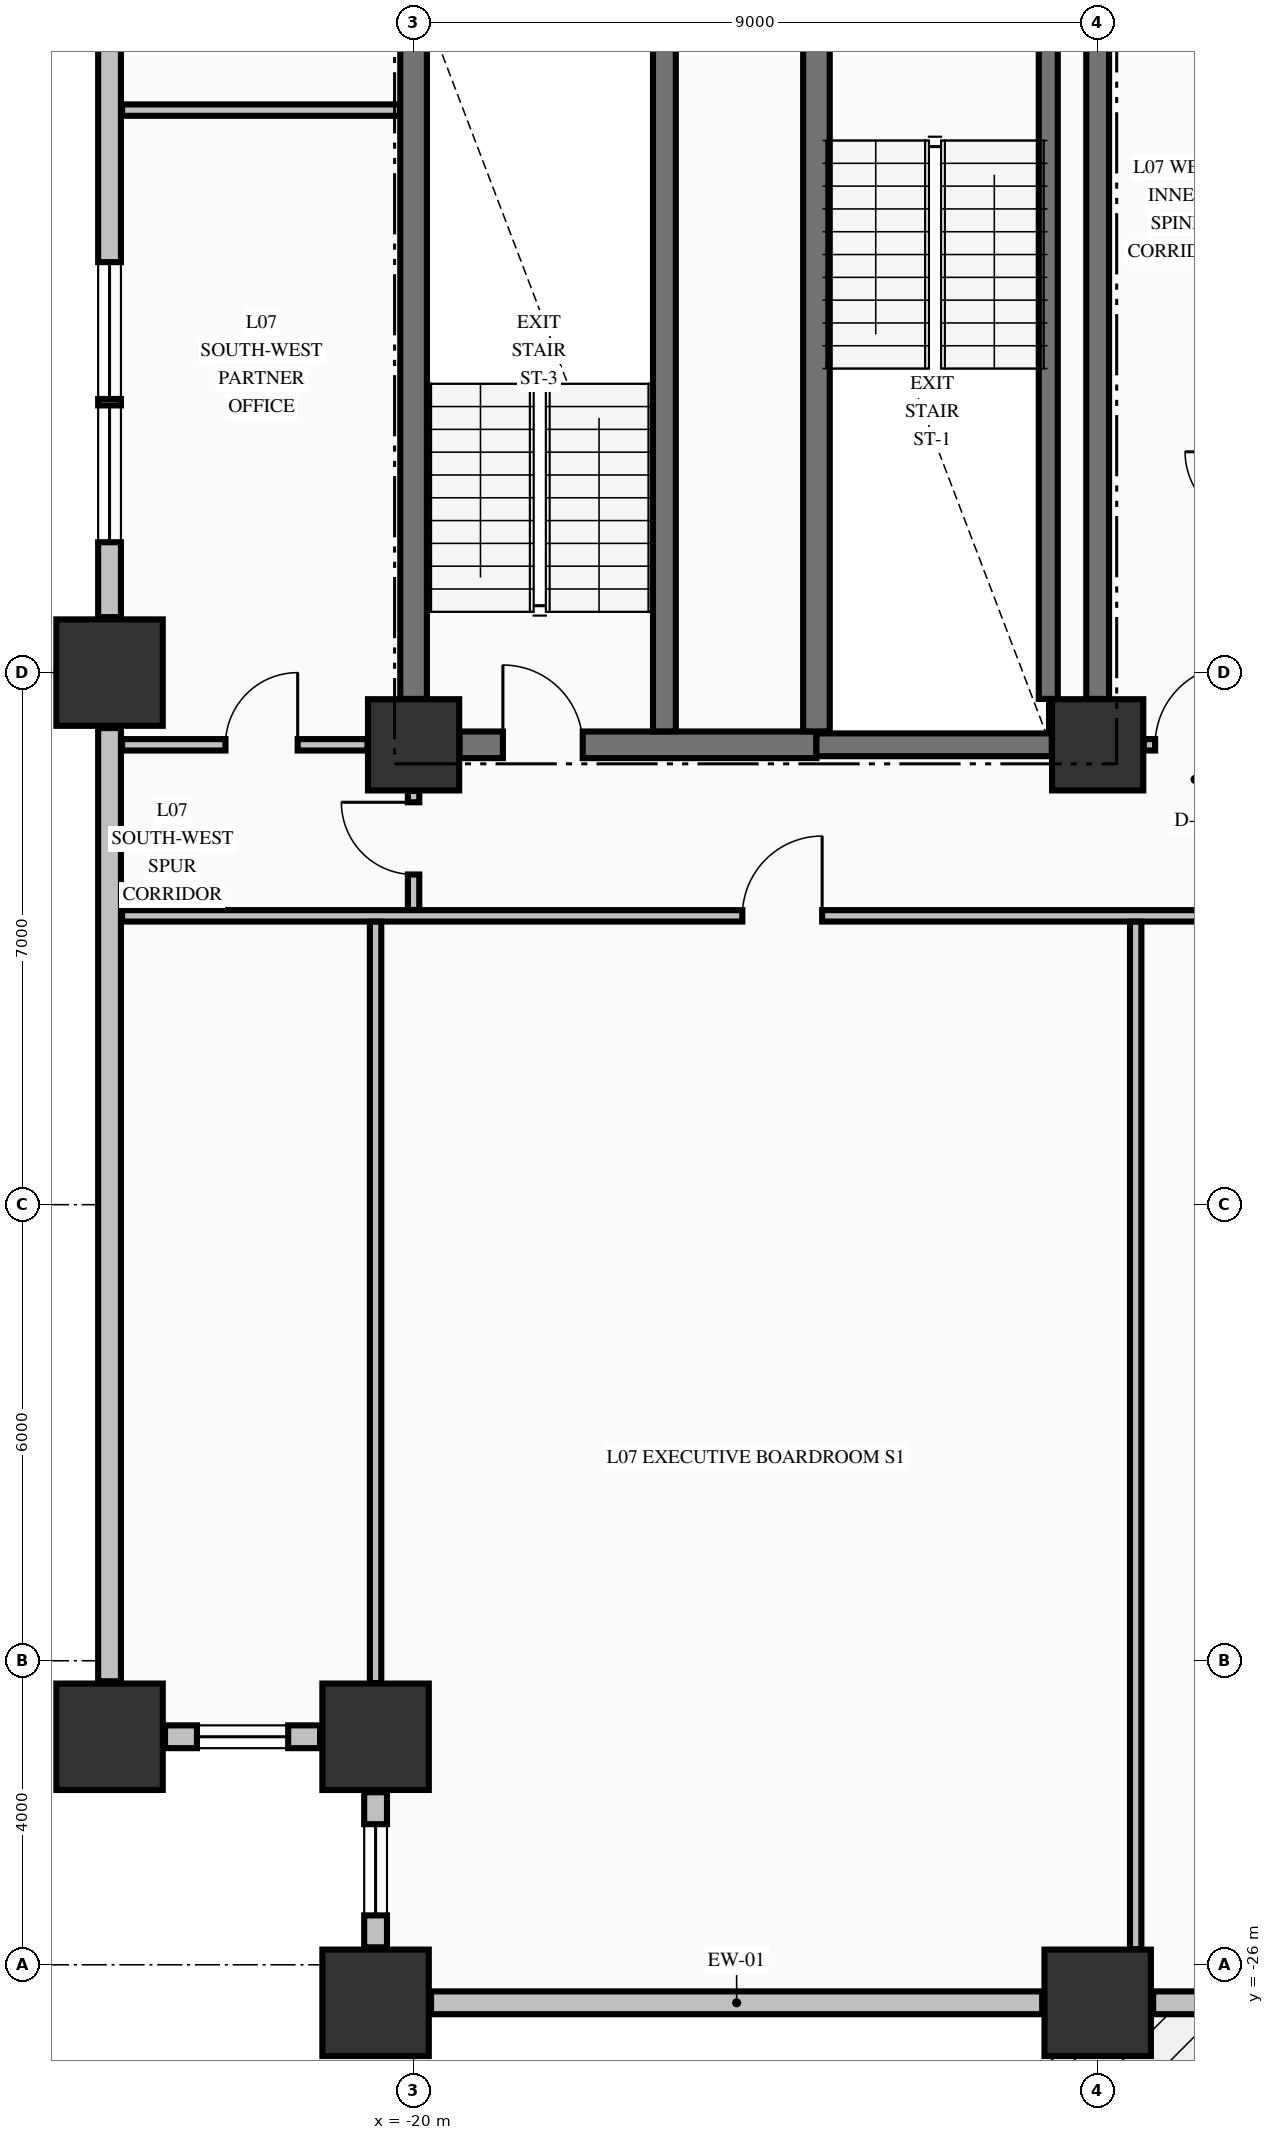
"""IFC4 building model, lengths in metres.
Left out: names, types, materials, properties, quantities, classifications, styles, units other than length and angle.
Written with IfcOpenShell. Run it as: python <this file> out.ifc"""

import sys

from ifc_helpers import new_model, si_unit, direction, frame, frame_2d, origin, origin_2d, place, context, subcontext, project, spatial, rectangle, extrude, element, fill, save


model = new_model("IFC4")
c1 = context("Model", 3, precision=1e-05, world=origin(), true_north=direction((0.0, 1.0)))
c2 = subcontext(c1, "Body", "Model", "MODEL_VIEW")
j1 = project(units=[si_unit("LENGTHUNIT", "METRE"), si_unit("PLANEANGLEUNIT", "RADIAN")], contexts=[c1])
p1 = place(None, origin())
s1 = spatial("IfcSite", under=j1, at=p1, CompositionType="ELEMENT")
p2 = place(p1, origin())
s2 = spatial("IfcBuilding", under=s1, at=p2, CompositionType="ELEMENT")
p3 = place(p2, frame((0.0, 0.0, 34.34)))
s3 = spatial("IfcBuildingStorey", under=s2, at=p3, CompositionType="ELEMENT", Elevation=34.34)
for number, where, z_axis, x_axis in (
    (1, (-20.5, -26.5, -0.3), (0.0, 0.0, 1.0), (1.0, 0.0, 0.0)),
    (2, (-11.0, -26.5, -0.3), (0.0, 0.0, 1.0), (1.0, 0.0, 0.0)),
    (3, (-24.0, -23.0, -0.3), (0.0, 0.0, 1.0), (1.0, 0.0, 0.0)),
    (4, (-24.0, -9.0, -0.3), (0.0, 0.0, 1.0), (1.0, 0.0, 0.0)),
    (5, (-20.5, -23.0, -0.3), (0.0, 0.0, 1.0), (1.0, 0.0, 0.0)),
):
    element("IfcColumn", number, at=place(p3, frame(where, z_axis=z_axis, x_axis=x_axis)), inside=s3, PredefinedType="COLUMN", context=c2, shape_type="SweptSolid", body=[
        extrude(rectangle(XDim=1.4, YDim=1.4, at=origin_2d()), origin(), (0.0, 0.0, 1.0), 3.62),
    ])
for number, where, z_axis, x_axis in (
    (6, (-20.0, -9.95, -0.3), (0.0, 0.0, 1.0), (1.0, 0.0, 0.0)),
    (7, (-11.0, -9.95, -0.3), (0.0, 0.0, 1.0), (1.0, 0.0, 0.0)),
):
    element("IfcColumn", number, at=place(p3, frame(where, z_axis=z_axis, x_axis=x_axis)), inside=s3, PredefinedType="COLUMN", context=c2, shape_type="SweptSolid", body=[
        extrude(rectangle(XDim=1.2, YDim=1.2, at=origin_2d()), origin(), (0.0, 0.0, 1.0), 3.62),
    ])
p4 = place(p3, frame((-23.27, -23.0, 0.0), z_axis=(0.0, 0.0, 1.0), x_axis=(1.0, 0.0, 0.0)))
e8 = element("IfcWall", 8, at=p4, inside=s3, PredefinedType="STANDARD", context=c2, shape_type="SweptSolid", body=[
    extrude(rectangle(XDim=2.04, YDim=0.3, at=frame_2d((1.02, 0.0))), origin(), (0.0, 0.0, 1.0), 2.712),
])
p5 = place(p4, frame((0.42, 0.0, 0.82)))
e9 = element("IfcOpeningElement", 9, at=p5, cuts=e8, PredefinedType="OPENING", context=c2, shape_type="SweptSolid", body=[
    extrude(rectangle(XDim=1.2, YDim=1.65, at=frame_2d((0.6, 0.825))), frame((0.0, 0.16, 0.0), z_axis=(0.0, -1.0, 0.0), x_axis=(1.0, 0.0, 0.0)), (0.0, 0.0, 1.0), 0.32),
])
p6 = place(p3, frame((-20.5, -23.73, 0.0), z_axis=(0.0, 0.0, 1.0), x_axis=(0.0, -1.0, 0.0)))
e10 = element("IfcWall", 10, at=p6, inside=s3, PredefinedType="STANDARD", context=c2, shape_type="SweptSolid", body=[
    extrude(rectangle(XDim=2.04, YDim=0.3, at=frame_2d((1.02, 0.0))), origin(), (0.0, 0.0, 1.0), 2.712),
])
p7 = place(p6, frame((0.42, 0.0, 0.82)))
e11 = element("IfcOpeningElement", 11, at=p7, cuts=e10, PredefinedType="OPENING", context=c2, shape_type="SweptSolid", body=[
    extrude(rectangle(XDim=1.2, YDim=1.65, at=frame_2d((0.6, 0.825))), frame((0.0, 0.16, 0.0), z_axis=(0.0, -1.0, 0.0), x_axis=(1.0, 0.0, 0.0)), (0.0, 0.0, 1.0), 0.32),
])
p8 = place(p3, frame((-19.77, -26.5, 0.0), z_axis=(0.0, 0.0, 1.0), x_axis=(1.0, 0.0, 0.0)))
e12 = element("IfcWall", 12, at=p8, inside=s3, PredefinedType="STANDARD", context=c2, shape_type="SweptSolid", body=[
    extrude(rectangle(XDim=8.04, YDim=0.3, at=frame_2d((4.02, 0.0))), origin(), (0.0, 0.0, 1.0), 2.712),
])
p9 = place(p3, frame((-10.27, -26.5, 0.0), z_axis=(0.0, 0.0, 1.0), x_axis=(1.0, 0.0, 0.0)))
e13 = element("IfcWall", 13, at=p9, inside=s3, PredefinedType="STANDARD", context=c2, shape_type="SweptSolid", body=[
    extrude(rectangle(XDim=9.54, YDim=0.3, at=frame_2d((4.77, 0.0))), origin(), (0.0, 0.0, 1.0), 2.712),
])
p10 = place(p9, frame((4.555, 0.0, 0.0)))
e14 = element("IfcOpeningElement", 14, at=p10, cuts=e13, PredefinedType="OPENING", context=c2, shape_type="SweptSolid", body=[
    extrude(rectangle(XDim=1.1, YDim=2.15, at=frame_2d((0.55, 1.075))), frame((0.0, 0.16, 0.0), z_axis=(0.0, -1.0, 0.0), x_axis=(1.0, 0.0, 0.0)), (0.0, 0.0, 1.0), 0.32),
])
p11 = place(p9, frame((1.485, 0.0, 0.78)))
e15 = element("IfcOpeningElement", 15, at=p11, cuts=e13, PredefinedType="OPENING", context=c2, shape_type="SweptSolid", body=[
    extrude(rectangle(XDim=1.8, YDim=1.72, at=frame_2d((0.9, 0.86))), frame((0.0, 0.16, 0.0), z_axis=(0.0, -1.0, 0.0), x_axis=(1.0, 0.0, 0.0)), (0.0, 0.0, 1.0), 0.32),
])
p12 = place(p9, frame((6.255, 0.0, 0.78)))
e16 = element("IfcOpeningElement", 16, at=p12, cuts=e13, PredefinedType="OPENING", context=c2, shape_type="SweptSolid", body=[
    extrude(rectangle(XDim=1.8, YDim=1.72, at=frame_2d((0.9, 0.86))), frame((0.0, 0.16, 0.0), z_axis=(0.0, -1.0, 0.0), x_axis=(1.0, 0.0, 0.0)), (0.0, 0.0, 1.0), 0.32),
])
p13 = place(p3, frame((-24.0, -9.73, 0.0), z_axis=(0.0, 0.0, 1.0), x_axis=(0.0, -1.0, 0.0)))
e17 = element("IfcWall", 17, at=p13, inside=s3, PredefinedType="STANDARD", context=c2, shape_type="SweptSolid", body=[
    extrude(rectangle(XDim=12.54, YDim=0.3, at=frame_2d((6.27, 0.0))), origin(), (0.0, 0.0, 1.0), 2.712),
])
p14 = place(p3, frame((-24.0, -0.73, 0.0), z_axis=(0.0, 0.0, 1.0), x_axis=(0.0, -1.0, 0.0)))
e18 = element("IfcWall", 18, at=p14, inside=s3, PredefinedType="STANDARD", context=c2, shape_type="SweptSolid", body=[
    extrude(rectangle(XDim=7.54, YDim=0.3, at=frame_2d((3.77, 0.0))), origin(), (0.0, 0.0, 1.0), 2.712),
])
p15 = place(p14, frame((2.87, 0.0, 0.78)))
e19 = element("IfcOpeningElement", 19, at=p15, cuts=e18, PredefinedType="OPENING", context=c2, shape_type="SweptSolid", body=[
    extrude(rectangle(XDim=1.8, YDim=1.72, at=frame_2d((0.9, 0.86))), frame((0.0, 0.16, 0.0), z_axis=(0.0, -1.0, 0.0), x_axis=(1.0, 0.0, 0.0)), (0.0, 0.0, 1.0), 0.32),
])
p16 = place(p14, frame((4.755, 0.0, 0.78)))
e20 = element("IfcOpeningElement", 20, at=p16, cuts=e18, PredefinedType="OPENING", context=c2, shape_type="SweptSolid", body=[
    extrude(rectangle(XDim=1.8, YDim=1.72, at=frame_2d((0.9, 0.86))), frame((0.0, 0.16, 0.0), z_axis=(0.0, -1.0, 0.0), x_axis=(1.0, 0.0, 0.0)), (0.0, 0.0, 1.0), 0.32),
])
p17 = place(p3, frame((-19.396, -9.95, 0.0), z_axis=(0.0, 0.0, 1.0), x_axis=(1.0, 0.0, 0.0)))
e21 = element("IfcWall", 21, at=p17, inside=s3, PredefinedType="SHEAR", context=c2, shape_type="SweptSolid", body=[
    extrude(rectangle(XDim=4.696, YDim=0.35, at=frame_2d((2.348, 0.0))), origin(), (0.0, 0.0, 1.0), 3.32),
])
p18 = place(p17, frame((0.571, 0.0, 0.0)))
e22 = element("IfcOpeningElement", 22, at=p18, cuts=e21, PredefinedType="OPENING", context=c2, shape_type="SweptSolid", body=[
    extrude(rectangle(XDim=1.05, YDim=2.15, at=frame_2d((0.525, 1.075))), frame((0.0, 0.185, 0.0), z_axis=(0.0, -1.0, 0.0), x_axis=(1.0, 0.0, 0.0)), (0.0, 0.0, 1.0), 0.37),
])
p19 = place(p3, frame((-14.7, -9.95, 0.0), z_axis=(0.0, 0.0, 1.0), x_axis=(1.0, 0.0, 0.0)))
e23 = element("IfcWall", 23, at=p19, inside=s3, PredefinedType="SHEAR", context=c2, shape_type="SweptSolid", body=[
    extrude(rectangle(XDim=3.096, YDim=0.3, at=frame_2d((1.548, 0.0))), origin(), (0.0, 0.0, 1.0), 3.32),
])
p20 = place(p3, frame((-23.835, -12.2, 0.0), z_axis=(0.0, 0.0, 1.0), x_axis=(1.0, 0.0, 0.0)))
e24 = element("IfcWall", 24, at=p20, inside=s3, PredefinedType="PARTITIONING", context=c2, shape_type="SweptSolid", body=[
    extrude(rectangle(XDim=52.67, YDim=0.15, at=frame_2d((26.335, 0.0))), origin(), (0.0, 0.0, 1.0), 3.32),
])
p21 = place(p20, frame((8.16, 0.0, 0.0)))
e25 = element("IfcOpeningElement", 25, at=p21, cuts=e24, PredefinedType="OPENING", context=c2, shape_type="SweptSolid", body=[
    extrude(rectangle(XDim=1.05, YDim=2.15, at=frame_2d((0.525, 1.075))), frame((0.0, 0.085, 0.0), z_axis=(0.0, -1.0, 0.0), x_axis=(1.0, 0.0, 0.0)), (0.0, 0.0, 1.0), 0.17),
])
p22 = place(p20, frame((18.31, 0.0, 0.0)))
e26 = element("IfcOpeningElement", 26, at=p22, cuts=e24, PredefinedType="OPENING", context=c2, shape_type="SweptSolid", body=[
    extrude(rectangle(XDim=1.05, YDim=2.15, at=frame_2d((0.525, 1.075))), frame((0.0, 0.085, 0.0), z_axis=(0.0, -1.0, 0.0), x_axis=(1.0, 0.0, 0.0)), (0.0, 0.0, 1.0), 0.17),
])
p23 = place(p20, frame((41.46, 0.0, 0.0)))
e27 = element("IfcOpeningElement", 27, at=p23, cuts=e24, PredefinedType="OPENING", context=c2, shape_type="SweptSolid", body=[
    extrude(rectangle(XDim=1.05, YDim=2.15, at=frame_2d((0.525, 1.075))), frame((0.0, 0.085, 0.0), z_axis=(0.0, -1.0, 0.0), x_axis=(1.0, 0.0, 0.0)), (0.0, 0.0, 1.0), 0.17),
])
p24 = place(p3, frame((-23.835, -9.95, 0.0), z_axis=(0.0, 0.0, 1.0), x_axis=(1.0, 0.0, 0.0)))
e28 = element("IfcWall", 28, at=p24, inside=s3, PredefinedType="PARTITIONING", context=c2, shape_type="SweptSolid", body=[
    extrude(rectangle(XDim=3.229, YDim=0.15, at=frame_2d((1.615, 0.0))), origin(), (0.0, 0.0, 1.0), 3.32),
])
p25 = place(p24, frame((1.36, 0.0, 0.0)))
e29 = element("IfcOpeningElement", 29, at=p25, cuts=e28, PredefinedType="OPENING", context=c2, shape_type="SweptSolid", body=[
    extrude(rectangle(XDim=0.95, YDim=2.15, at=frame_2d((0.475, 1.075))), frame((0.0, 0.085, 0.0), z_axis=(0.0, -1.0, 0.0), x_axis=(1.0, 0.0, 0.0)), (0.0, 0.0, 1.0), 0.17),
])
p26 = place(p3, frame((-10.394, -9.95, 0.0), z_axis=(0.0, 0.0, 1.0), x_axis=(1.0, 0.0, 0.0)))
e30 = element("IfcWall", 30, at=p26, inside=s3, PredefinedType="PARTITIONING", context=c2, shape_type="SweptSolid", body=[
    extrude(rectangle(XDim=20.788, YDim=0.15, at=frame_2d((10.394, 0.0))), origin(), (0.0, 0.0, 1.0), 3.32),
])
p27 = place(p26, frame((0.15, 0.0, 0.0)))
e31 = element("IfcOpeningElement", 31, at=p27, cuts=e30, PredefinedType="OPENING", context=c2, shape_type="SweptSolid", body=[
    extrude(rectangle(XDim=1.05, YDim=2.15, at=frame_2d((0.525, 1.075))), frame((0.0, 0.085, 0.0), z_axis=(0.0, -1.0, 0.0), x_axis=(1.0, 0.0, 0.0)), (0.0, 0.0, 1.0), 0.17),
])
p28 = place(p26, frame((19.588, 0.0, 0.0)))
e32 = element("IfcOpeningElement", 32, at=p28, cuts=e30, PredefinedType="OPENING", context=c2, shape_type="SweptSolid", body=[
    extrude(rectangle(XDim=1.05, YDim=2.15, at=frame_2d((0.525, 1.075))), frame((0.0, 0.085, 0.0), z_axis=(0.0, -1.0, 0.0), x_axis=(1.0, 0.0, 0.0)), (0.0, 0.0, 1.0), 0.17),
])
p29 = place(p26, frame((11.969, 0.0, 0.0)))
e33 = element("IfcOpeningElement", 33, at=p29, cuts=e30, PredefinedType="OPENING", context=c2, shape_type="SweptSolid", body=[
    extrude(rectangle(XDim=0.95, YDim=2.15, at=frame_2d((0.475, 1.075))), frame((0.0, 0.085, 0.0), z_axis=(0.0, -1.0, 0.0), x_axis=(1.0, 0.0, 0.0)), (0.0, 0.0, 1.0), 0.17),
])
p30 = place(p3, frame((-23.835, -1.6, 0.0), z_axis=(0.0, 0.0, 1.0), x_axis=(1.0, 0.0, 0.0)))
e34 = element("IfcWall", 34, at=p30, inside=s3, PredefinedType="PARTITIONING", context=c2, shape_type="SweptSolid", body=[
    extrude(rectangle(XDim=3.657, YDim=0.15, at=frame_2d((1.829, 0.0))), origin(), (0.0, 0.0, 1.0), 3.32),
])
p31 = place(p3, frame((-20.0, -9.346, 0.0), z_axis=(0.0, 0.0, 1.0), x_axis=(0.0, 1.0, 0.0)))
e35 = element("IfcWall", 35, at=p31, inside=s3, PredefinedType="SHEAR", context=c2, shape_type="SweptSolid", body=[
    extrude(rectangle(XDim=8.742, YDim=0.35, at=frame_2d((4.371, 0.0))), origin(), (0.0, 0.0, 1.0), 3.32),
])
p32 = place(p3, frame((-16.7, -9.773, 0.0), z_axis=(0.0, 0.0, 1.0), x_axis=(0.0, 1.0, 0.0)))
e36 = element("IfcWall", 36, at=p32, inside=s3, PredefinedType="SHEAR", context=c2, shape_type="SweptSolid", body=[
    extrude(rectangle(XDim=9.371, YDim=0.3, at=frame_2d((4.686, 0.0))), origin(), (0.0, 0.0, 1.0), 3.32),
])
p33 = place(p3, frame((-14.7, -9.773, 0.0), z_axis=(0.0, 0.0, 1.0), x_axis=(0.0, 1.0, 0.0)))
e37 = element("IfcWall", 37, at=p33, inside=s3, PredefinedType="SHEAR", context=c2, shape_type="SweptSolid", body=[
    extrude(rectangle(XDim=9.371, YDim=0.35, at=frame_2d((4.686, 0.0))), origin(), (0.0, 0.0, 1.0), 3.32),
])
p34 = place(p3, frame((-11.65, -9.346, 0.0), z_axis=(0.0, 0.0, 1.0), x_axis=(0.0, 1.0, 0.0)))
e38 = element("IfcWall", 38, at=p34, inside=s3, PredefinedType="SOLIDWALL", context=c2, shape_type="SweptSolid", body=[
    extrude(rectangle(XDim=8.742, YDim=0.25, at=frame_2d((4.371, 0.0))), origin(), (0.0, 0.0, 1.0), 3.32),
])
p35 = place(p3, frame((-11.0, -9.346, 0.0), z_axis=(0.0, 0.0, 1.0), x_axis=(0.0, 1.0, 0.0)))
e39 = element("IfcWall", 39, at=p35, inside=s3, PredefinedType="SHEAR", context=c2, shape_type="SweptSolid", body=[
    extrude(rectangle(XDim=8.742, YDim=0.3, at=frame_2d((4.371, 0.0))), origin(), (0.0, 0.0, 1.0), 3.32),
])
p36 = place(p3, frame((-20.5, -22.294, 0.0), z_axis=(0.0, 0.0, 1.0), x_axis=(0.0, 1.0, 0.0)))
e40 = element("IfcWall", 40, at=p36, inside=s3, PredefinedType="PARTITIONING", context=c2, shape_type="SweptSolid", body=[
    extrude(rectangle(XDim=10.016, YDim=0.15, at=frame_2d((5.008, 0.0))), origin(), (0.0, 0.0, 1.0), 3.32),
])
p37 = place(p3, frame((-20.0, -12.122, 0.0), z_axis=(0.0, 0.0, 1.0), x_axis=(0.0, 1.0, 0.0)))
e41 = element("IfcWall", 41, at=p37, inside=s3, PredefinedType="PARTITIONING", context=c2, shape_type="SweptSolid", body=[
    extrude(rectangle(XDim=1.566, YDim=0.15, at=frame_2d((0.783, 0.0))), origin(), (0.0, 0.0, 1.0), 3.32),
])
p38 = place(p37, frame((0.466, 0.0, 0.0)))
e42 = element("IfcOpeningElement", 42, at=p38, cuts=e41, PredefinedType="OPENING", context=c2, shape_type="SweptSolid", body=[
    extrude(rectangle(XDim=0.95, YDim=2.15, at=frame_2d((0.475, 1.075))), frame((0.0, 0.085, 0.0), z_axis=(0.0, -1.0, 0.0), x_axis=(1.0, 0.0, 0.0)), (0.0, 0.0, 1.0), 0.17),
])
p39 = place(p3, frame((-10.5, -25.794, 0.0), z_axis=(0.0, 0.0, 1.0), x_axis=(0.0, 1.0, 0.0)))
e43 = element("IfcWall", 43, at=p39, inside=s3, PredefinedType="PARTITIONING", context=c2, shape_type="SweptSolid", body=[
    extrude(rectangle(XDim=13.516, YDim=0.15, at=frame_2d((6.758, 0.0))), origin(), (0.0, 0.0, 1.0), 3.32),
])
p40 = place(p5, origin())
e44 = element("IfcWindow", 44, at=p40, inside=s3, PartitioningType="SINGLE_PANEL", PredefinedType="WINDOW", context=c2, shape_type="SweptSolid", body=[
    extrude(rectangle(XDim=1.2, YDim=1.65, at=frame_2d((0.6, 0.825))), frame((0.0, 0.03, 0.0), z_axis=(0.0, -1.0, 0.0), x_axis=(1.0, 0.0, 0.0)), (0.0, 0.0, 1.0), 0.06),
])
fill(e9, e44)
p41 = place(p7, origin())
e45 = element("IfcWindow", 45, at=p41, inside=s3, PartitioningType="SINGLE_PANEL", PredefinedType="WINDOW", context=c2, shape_type="SweptSolid", body=[
    extrude(rectangle(XDim=1.2, YDim=1.65, at=frame_2d((0.6, 0.825))), frame((0.0, 0.03, 0.0), z_axis=(0.0, -1.0, 0.0), x_axis=(1.0, 0.0, 0.0)), (0.0, 0.0, 1.0), 0.06),
])
fill(e11, e45)
p42 = place(p15, origin())
e46 = element("IfcWindow", 46, at=p42, inside=s3, PartitioningType="SINGLE_PANEL", PredefinedType="WINDOW", context=c2, shape_type="SweptSolid", body=[
    extrude(rectangle(XDim=1.8, YDim=1.72, at=frame_2d((0.9, 0.86))), frame((0.0, 0.03, 0.0), z_axis=(0.0, -1.0, 0.0), x_axis=(1.0, 0.0, 0.0)), (0.0, 0.0, 1.0), 0.06),
])
fill(e19, e46)
p43 = place(p16, origin())
e47 = element("IfcWindow", 47, at=p43, inside=s3, PartitioningType="SINGLE_PANEL", PredefinedType="WINDOW", context=c2, shape_type="SweptSolid", body=[
    extrude(rectangle(XDim=1.8, YDim=1.72, at=frame_2d((0.9, 0.86))), frame((0.0, 0.03, 0.0), z_axis=(0.0, -1.0, 0.0), x_axis=(1.0, 0.0, 0.0)), (0.0, 0.0, 1.0), 0.06),
])
fill(e20, e47)
p44 = place(p18, origin())
e48 = element("IfcDoor", 48, at=p44, inside=s3, OperationType="SINGLE_SWING_LEFT", PredefinedType="DOOR", context=c2, shape_type="SweptSolid", body=[
    extrude(rectangle(XDim=1.05, YDim=2.15, at=frame_2d((0.525, 1.075))), frame((0.0, 0.025, 0.0), z_axis=(0.0, -1.0, 0.0), x_axis=(1.0, 0.0, 0.0)), (0.0, 0.0, 1.0), 0.05),
])
fill(e22, e48)
p45 = place(p27, origin())
e49 = element("IfcDoor", 49, at=p45, inside=s3, OperationType="SINGLE_SWING_RIGHT", PredefinedType="DOOR", context=c2, shape_type="SweptSolid", body=[
    extrude(rectangle(XDim=1.05, YDim=2.15, at=frame_2d((0.525, 1.075))), frame((0.0, 0.025, 0.0), z_axis=(0.0, -1.0, 0.0), x_axis=(1.0, 0.0, 0.0)), (0.0, 0.0, 1.0), 0.05),
])
fill(e31, e49)
p46 = place(p21, origin())
e50 = element("IfcDoor", 50, at=p46, inside=s3, OperationType="SINGLE_SWING_RIGHT", PredefinedType="DOOR", context=c2, shape_type="SweptSolid", body=[
    extrude(rectangle(XDim=1.05, YDim=2.15, at=frame_2d((0.525, 1.075))), frame((0.0, 0.025, 0.0), z_axis=(0.0, -1.0, 0.0), x_axis=(1.0, 0.0, 0.0)), (0.0, 0.0, 1.0), 0.05),
])
fill(e25, e50)
p47 = place(p38, origin())
e51 = element("IfcDoor", 51, at=p47, inside=s3, OperationType="SINGLE_SWING_RIGHT", PredefinedType="DOOR", context=c2, shape_type="SweptSolid", body=[
    extrude(rectangle(XDim=0.95, YDim=2.15, at=frame_2d((0.475, 1.075))), frame((0.0, 0.025, 0.0), z_axis=(0.0, -1.0, 0.0), x_axis=(1.0, 0.0, 0.0)), (0.0, 0.0, 1.0), 0.05),
])
fill(e42, e51)
p48 = place(p25, origin())
e52 = element("IfcDoor", 52, at=p48, inside=s3, OperationType="SINGLE_SWING_RIGHT", PredefinedType="DOOR", context=c2, shape_type="SweptSolid", body=[
    extrude(rectangle(XDim=0.95, YDim=2.15, at=frame_2d((0.475, 1.075))), frame((0.0, 0.025, 0.0), z_axis=(0.0, -1.0, 0.0), x_axis=(1.0, 0.0, 0.0)), (0.0, 0.0, 1.0), 0.05),
])
fill(e29, e52)
save(model, sys.argv[1])
